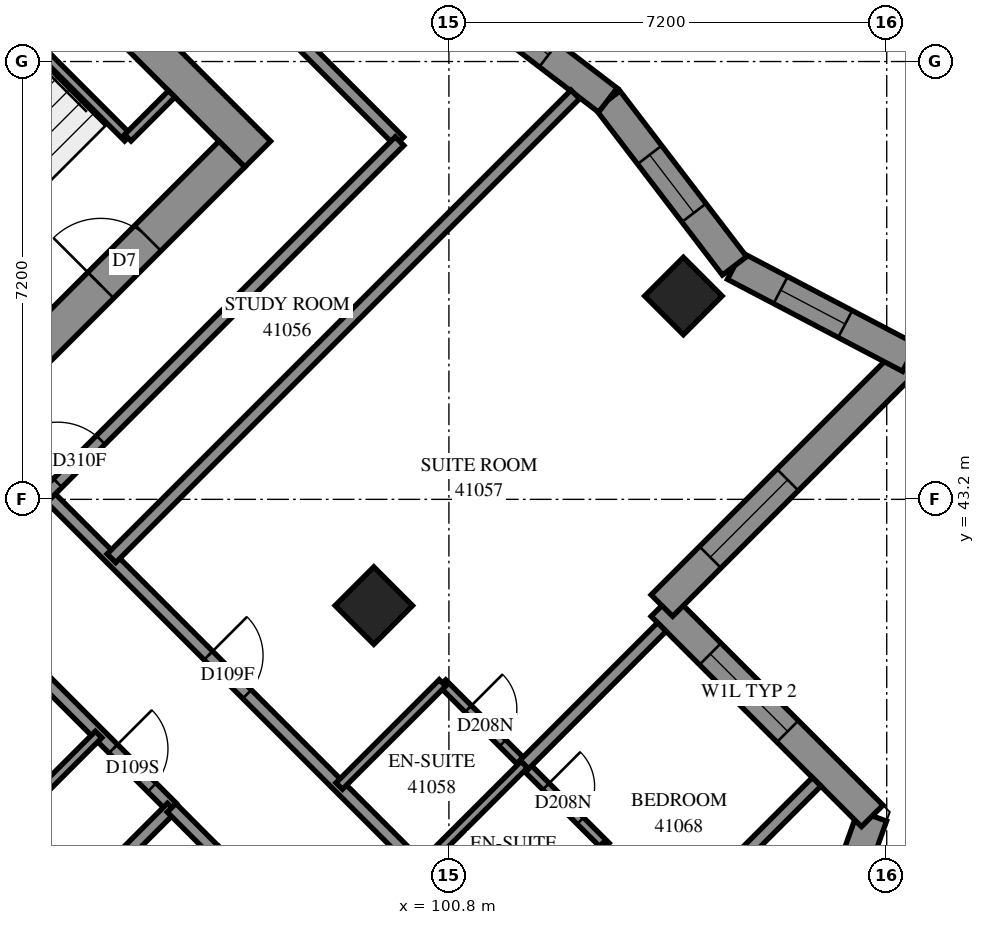
"""IFC4 building model, lengths in metres.
Left out: names, types, materials, properties, quantities, classifications, styles, units other than length and angle.
Written with IfcOpenShell. Run it as: python <this file> out.ifc"""

import sys

from ifc_helpers import new_model, si_unit, direction, frame, frame_2d, origin, origin_2d, place, context, subcontext, project, spatial, polyline, rectangle, outline, extrude, element, fill, save


model = new_model("IFC4")
c1 = context("Model", 3, precision=1e-05, world=origin(), true_north=direction((0.0, 1.0)))
c2 = subcontext(c1, "Body", "Model", "MODEL_VIEW")
j1 = project(units=[si_unit("LENGTHUNIT", "METRE"), si_unit("PLANEANGLEUNIT", "RADIAN")], contexts=[c1])
p1 = place(None, origin())
s1 = spatial("IfcSite", under=j1, at=p1, CompositionType="ELEMENT")
p2 = place(p1, origin())
s2 = spatial("IfcBuilding", under=s1, at=p2, CompositionType="ELEMENT")
p3 = place(p2, frame((0.0, 0.0, 152.4)))
s3 = spatial("IfcBuildingStorey", under=s2, at=p3, CompositionType="ELEMENT", Elevation=152.4)
for number, where, z_axis, x_axis in (
    (1, (104.656, 46.544, 0.0), (0.0, 0.0, 1.0), (0.707, -0.707, 0.0)),
    (2, (99.565, 41.453, 0.0), (0.0, 0.0, 1.0), (0.707, -0.707, 0.0)),
):
    element("IfcColumn", number, at=place(p3, frame(where, z_axis=z_axis, x_axis=x_axis)), inside=s3, PredefinedType="COLUMN", context=c2, shape_type="SweptSolid", body=[
        extrude(rectangle(XDim=0.9, YDim=0.9, at=origin_2d()), origin(), (0.0, 0.0, 1.0), 3.1),
    ])
p4 = place(p3, frame((86.625, 59.908, -0.3), z_axis=(0.0, 0.0, 1.0), x_axis=(0.7071067812, -0.7071067812, 0.0)))
e3 = element("IfcWall", 3, at=p4, inside=s3, PredefinedType="SHEAR", context=c2, shape_type="SweptSolid", body=[
    extrude(rectangle(XDim=15.6, YDim=0.6, at=frame_2d((7.8, 0.0))), origin(), (0.0, 0.0, 1.0), 2.7),
])
p5 = place(p4, frame((10.6, 0.0, 0.3)))
e4 = element("IfcOpeningElement", 4, at=p5, cuts=e3, PredefinedType="OPENING", context=c2, shape_type="SweptSolid", body=[
    extrude(rectangle(XDim=0.8, YDim=2.1, at=frame_2d((0.4, 1.05))), frame((0.0, 0.31, 0.0), z_axis=(0.0, -1.0, 0.0), x_axis=(1.0, 0.0, 0.0)), (0.0, 0.0, 1.0), 0.62),
])
p6 = place(p3, frame((87.049, 38.695, -0.3), z_axis=(0.0, 0.0, 1.0), x_axis=(0.7071067812, 0.7071067812, 0.0)))
e5 = element("IfcWall", 5, at=p6, inside=s3, PredefinedType="SHEAR", context=c2, shape_type="SweptSolid", body=[
    extrude(rectangle(XDim=14.4, YDim=0.6, at=frame_2d((7.2, 0.0))), origin(), (0.0, 0.0, 1.0), 2.7),
])
p7 = place(p6, frame((4.55, 0.0, 0.3)))
e6 = element("IfcOpeningElement", 6, at=p7, cuts=e5, PredefinedType="OPENING", context=c2, shape_type="SweptSolid", body=[
    extrude(rectangle(XDim=1.1, YDim=2.1, at=frame_2d((0.55, 1.05))), frame((0.0, 0.31, 0.0), z_axis=(0.0, -1.0, 0.0), x_axis=(1.0, 0.0, 0.0)), (0.0, 0.0, 1.0), 0.62),
])
p8 = place(p6, frame((11.35, 0.0, 0.3)))
e7 = element("IfcOpeningElement", 7, at=p8, cuts=e5, PredefinedType="OPENING", context=c2, shape_type="SweptSolid", body=[
    extrude(rectangle(XDim=1.1, YDim=2.1, at=frame_2d((0.55, 1.05))), frame((0.0, 0.31, 0.0), z_axis=(0.0, -1.0, 0.0), x_axis=(1.0, 0.0, 0.0)), (0.0, 0.0, 1.0), 0.62),
])
p9 = place(p3, frame((105.97, 32.973, 0.0), z_axis=(0.0, 0.0, 1.0), x_axis=(0.3360618931, 0.9418399036, 0.0)))
e8 = element("IfcWall", 8, at=p9, inside=s3, PredefinedType="SOLIDWALL", context=c2, shape_type="SweptSolid", body=[
    extrude(outline(polyline([(-0.114, -0.25), (5.489, -0.25), (5.173, 0.25), (0.114, 0.25), (-0.114, -0.25)])), origin(), (0.0, 0.0, 1.0), 3.1),
])
p10 = place(p9, frame((1.164, 0.0, 0.45)))
e9 = element("IfcOpeningElement", 9, at=p10, cuts=e8, PredefinedType="OPENING", context=c2, shape_type="SweptSolid", body=[
    extrude(rectangle(XDim=1.2, YDim=2.5, at=frame_2d((0.6, 1.25))), frame((0.0, 0.26, 0.0), z_axis=(0.0, -1.0, 0.0), x_axis=(1.0, 0.0, 0.0)), (0.0, 0.0, 1.0), 0.52),
])
p11 = place(p9, frame((3.494, 0.0, 0.45)))
e10 = element("IfcOpeningElement", 10, at=p11, cuts=e8, PredefinedType="OPENING", context=c2, shape_type="SweptSolid", body=[
    extrude(rectangle(XDim=1.2, YDim=2.5, at=frame_2d((0.6, 1.25))), frame((0.0, 0.26, 0.0), z_axis=(0.0, -1.0, 0.0), x_axis=(1.0, 0.0, 0.0)), (0.0, 0.0, 1.0), 0.52),
])
p12 = place(p3, frame((107.761, 37.994, 0.0), z_axis=(0.0, 0.0, 1.0), x_axis=(-0.7071272228, 0.707086339, 0.0)))
e11 = element("IfcWall", 11, at=p12, inside=s3, PredefinedType="SOLIDWALL", context=c2, shape_type="SweptSolid", body=[
    extrude(outline(polyline([(-0.158, -0.25), (4.642, -0.25), (5.142, 0.25), (0.158, 0.25), (-0.158, -0.25)])), origin(), (0.0, 0.0, 1.0), 3.1),
])
p13 = place(p12, frame((1.967, 0.0, 0.6)))
e12 = element("IfcOpeningElement", 12, at=p13, cuts=e11, PredefinedType="OPENING", context=c2, shape_type="SweptSolid", body=[
    extrude(rectangle(XDim=1.8, YDim=1.9, at=frame_2d((0.9, 0.95))), frame((0.0, 0.26, 0.0), z_axis=(0.0, -1.0, 0.0), x_axis=(1.0, 0.0, 0.0)), (0.0, 0.0, 1.0), 0.52),
])
p14 = place(p3, frame((104.302, 41.453, 0.0), z_axis=(0.0, 0.0, 1.0), x_axis=(0.7071241375, 0.7070894244, 0.0)))
e13 = element("IfcWall", 13, at=p14, inside=s3, PredefinedType="SOLIDWALL", context=c2, shape_type="SweptSolid", body=[
    extrude(outline(polyline([(0.25, -0.25), (6.101, -0.25), (5.422, 0.25), (-0.25, 0.25), (0.25, -0.25)])), origin(), (0.0, 0.0, 1.0), 3.1),
])
p15 = place(p14, frame((1.125, 0.0, 0.6)))
e14 = element("IfcOpeningElement", 14, at=p15, cuts=e13, PredefinedType="OPENING", context=c2, shape_type="SweptSolid", body=[
    extrude(rectangle(XDim=1.8, YDim=1.9, at=frame_2d((0.9, 0.95))), frame((0.0, 0.26, 0.0), z_axis=(0.0, -1.0, 0.0), x_axis=(1.0, 0.0, 0.0)), (0.0, 0.0, 1.0), 0.52),
])
p16 = place(p3, frame((108.376, 45.527, 0.0), z_axis=(0.0, 0.0, 1.0), x_axis=(-0.8852707198, 0.4650760719, 0.0)))
e15 = element("IfcWall", 15, at=p16, inside=s3, PredefinedType="SOLIDWALL", context=c2, shape_type="SweptSolid", body=[
    extrude(outline(polyline([(-0.34, -0.25), (3.198, -0.25), (3.308, 0.25), (0.34, 0.25), (-0.34, -0.25)])), origin(), (0.0, 0.0, 1.0), 3.1),
])
p17 = place(p16, frame((1.196, 0.0, 0.45)))
e16 = element("IfcOpeningElement", 16, at=p17, cuts=e15, PredefinedType="OPENING", context=c2, shape_type="SweptSolid", body=[
    extrude(rectangle(XDim=1.2, YDim=2.5, at=frame_2d((0.6, 1.25))), frame((0.0, 0.26, 0.0), z_axis=(0.0, -1.0, 0.0), x_axis=(1.0, 0.0, 0.0)), (0.0, 0.0, 1.0), 0.52),
])
p18 = place(p3, frame((105.496, 47.04, 0.0), z_axis=(0.0, 0.0, 1.0), x_axis=(-0.6072996528, 0.7944728641, 0.0)))
e17 = element("IfcWall", 17, at=p18, inside=s3, PredefinedType="SOLIDWALL", context=c2, shape_type="SweptSolid", body=[
    extrude(outline(polyline([(0.055, -0.25), (3.463, -0.25), (3.396, 0.25), (-0.055, 0.25), (0.055, -0.25)])), origin(), (0.0, 0.0, 1.0), 3.1),
])
p19 = place(p18, frame((1.098, 0.0, 0.45)))
e18 = element("IfcOpeningElement", 18, at=p19, cuts=e17, PredefinedType="OPENING", context=c2, shape_type="SweptSolid", body=[
    extrude(rectangle(XDim=1.2, YDim=2.5, at=frame_2d((0.6, 1.25))), frame((0.0, 0.26, 0.0), z_axis=(0.0, -1.0, 0.0), x_axis=(1.0, 0.0, 0.0)), (0.0, 0.0, 1.0), 0.52),
])
p20 = place(p3, frame((103.414, 49.764, 0.0), z_axis=(0.0, 0.0, 1.0), x_axis=(-0.7944694348, 0.6073041389, 0.0)))
e19 = element("IfcWall", 19, at=p20, inside=s3, PredefinedType="SOLIDWALL", context=c2, shape_type="SweptSolid", body=[
    extrude(outline(polyline([(-0.033, -0.25), (3.374, -0.25), (3.441, 0.25), (0.033, 0.25), (-0.033, -0.25)])), origin(), (0.0, 0.0, 1.0), 3.1),
])
p21 = place(p20, frame((1.228, 0.0, 0.45)))
e20 = element("IfcOpeningElement", 20, at=p21, cuts=e19, PredefinedType="OPENING", context=c2, shape_type="SweptSolid", body=[
    extrude(rectangle(XDim=1.2, YDim=2.5, at=frame_2d((0.6, 1.25))), frame((0.0, 0.26, 0.0), z_axis=(0.0, -1.0, 0.0), x_axis=(1.0, 0.0, 0.0)), (0.0, 0.0, 1.0), 0.52),
])
p22 = place(p3, frame((91.313, 53.354, 0.0), z_axis=(0.0, 0.0, 1.0), x_axis=(0.7071067812, -0.7071067812, 0.0)))
e21 = element("IfcWall", 21, at=p22, inside=s3, PredefinedType="PARTITIONING", context=c2, shape_type="SweptSolid", body=[
    extrude(rectangle(XDim=5.95, YDim=0.15, at=frame_2d((2.975, 0.0))), origin(), (0.0, 0.0, 1.0), 3.1),
])
p23 = place(p3, frame((95.52, 49.146, 0.0), z_axis=(0.0, 0.0, 1.0), x_axis=(0.7071067812, 0.7071067812, 0.0)))
e22 = element("IfcWall", 22, at=p23, inside=s3, PredefinedType="PARTITIONING", context=c2, shape_type="SweptSolid", body=[
    extrude(rectangle(XDim=1.02, YDim=0.15, at=frame_2d((0.51, 0.0))), origin(), (0.0, 0.0, 1.0), 3.1),
])
p24 = place(p3, frame((94.189, 43.287, 0.0), z_axis=(0.0, 0.0, 1.0), x_axis=(0.7071067812, -0.7071067812, 0.0)))
e23 = element("IfcWall", 23, at=p24, inside=s3, PredefinedType="PARTITIONING", context=c2, shape_type="SweptSolid", body=[
    extrude(rectangle(XDim=12.298, YDim=0.2, at=frame_2d((6.149, 0.0))), origin(), (0.0, 0.0, 1.0), 3.1),
])
p25 = place(p24, frame((3.755, 0.0, 0.0)))
e24 = element("IfcOpeningElement", 24, at=p25, cuts=e23, PredefinedType="OPENING", context=c2, shape_type="SweptSolid", body=[
    extrude(rectangle(XDim=0.9, YDim=2.1, at=frame_2d((0.45, 1.05))), frame((0.0, 0.11, 0.0), z_axis=(0.0, -1.0, 0.0), x_axis=(1.0, 0.0, 0.0)), (0.0, 0.0, 1.0), 0.22),
])
p26 = place(p24, frame((10.998, 0.0, 0.0)))
e25 = element("IfcOpeningElement", 25, at=p26, cuts=e23, PredefinedType="OPENING", context=c2, shape_type="SweptSolid", body=[
    extrude(rectangle(XDim=0.9, YDim=2.1, at=frame_2d((0.45, 1.05))), frame((0.0, 0.11, 0.0), z_axis=(0.0, -1.0, 0.0), x_axis=(1.0, 0.0, 0.0)), (0.0, 0.0, 1.0), 0.22),
])
p27 = place(p3, frame((91.755, 57.317, 0.0), z_axis=(0.0, 0.0, 1.0), x_axis=(0.7071067812, -0.7071067812, 0.0)))
e26 = element("IfcWall", 26, at=p27, inside=s3, PredefinedType="PARTITIONING", context=c2, shape_type="SweptSolid", body=[
    extrude(rectangle(XDim=11.639, YDim=0.2, at=frame_2d((5.819, 0.0))), origin(), (0.0, 0.0, 1.0), 3.1),
])
p28 = place(p3, frame((95.25, 42.232, 0.0), z_axis=(0.0, 0.0, 1.0), x_axis=(0.7071114163, 0.707102146, 0.0)))
e27 = element("IfcWall", 27, at=p28, inside=s3, PredefinedType="PARTITIONING", context=c2, shape_type="SweptSolid", body=[
    extrude(rectangle(XDim=10.787, YDim=0.2, at=frame_2d((5.394, 0.0))), origin(), (0.0, 0.0, 1.0), 3.1),
])
p29 = place(p3, frame((94.19, 43.292, 0.0), z_axis=(0.0, 0.0, 1.0), x_axis=(0.7071067812, 0.7071067812, 0.0)))
e28 = element("IfcWall", 28, at=p29, inside=s3, PredefinedType="PARTITIONING", context=c2, shape_type="SweptSolid", body=[
    extrude(rectangle(XDim=8.2, YDim=0.2, at=frame_2d((4.1, 0.0))), origin(), (0.0, 0.0, 1.0), 3.1),
])
p30 = place(p29, frame((0.251, 0.0, 0.0)))
e29 = element("IfcOpeningElement", 29, at=p30, cuts=e28, PredefinedType="OPENING", context=c2, shape_type="SweptSolid", body=[
    extrude(rectangle(XDim=1.0, YDim=2.1, at=frame_2d((0.5, 1.05))), frame((0.0, 0.11, 0.0), z_axis=(0.0, -1.0, 0.0), x_axis=(1.0, 0.0, 0.0)), (0.0, 0.0, 1.0), 0.22),
])
p31 = place(p3, frame((92.639, 41.739, 0.0), z_axis=(0.0, 0.0, 1.0), x_axis=(0.7071067812, -0.7071067812, 0.0)))
e30 = element("IfcWall", 30, at=p31, inside=s3, PredefinedType="PARTITIONING", context=c2, shape_type="SweptSolid", body=[
    extrude(rectangle(XDim=5.1, YDim=0.2, at=frame_2d((2.55, 0.0))), origin(), (0.0, 0.0, 1.0), 3.1),
])
p32 = place(p31, frame((0.123, 0.0, 0.0)))
e31 = element("IfcOpeningElement", 31, at=p32, cuts=e30, PredefinedType="OPENING", context=c2, shape_type="SweptSolid", body=[
    extrude(rectangle(XDim=1.0, YDim=2.1, at=frame_2d((0.5, 1.05))), frame((0.0, 0.11, 0.0), z_axis=(0.0, -1.0, 0.0), x_axis=(1.0, 0.0, 0.0)), (0.0, 0.0, 1.0), 0.22),
])
p33 = place(p31, frame((3.734, 0.0, 0.0)))
e32 = element("IfcOpeningElement", 32, at=p33, cuts=e30, PredefinedType="OPENING", context=c2, shape_type="SweptSolid", body=[
    extrude(rectangle(XDim=0.9, YDim=2.1, at=frame_2d((0.45, 1.05))), frame((0.0, 0.11, 0.0), z_axis=(0.0, -1.0, 0.0), x_axis=(1.0, 0.0, 0.0)), (0.0, 0.0, 1.0), 0.22),
])
p34 = place(p3, frame((100.694, 40.178, 0.0), z_axis=(0.0, 0.0, 1.0), x_axis=(0.7076329021, -0.7065802685, 0.0)))
e33 = element("IfcWall", 33, at=p34, inside=s3, PredefinedType="PARTITIONING", context=c2, shape_type="SweptSolid", body=[
    extrude(rectangle(XDim=3.8, YDim=0.15, at=frame_2d((1.9, 0.0))), origin(), (0.0, 0.0, 1.0), 3.1),
])
p35 = place(p34, frame((0.598, 0.0, 0.0)))
e34 = element("IfcOpeningElement", 34, at=p35, cuts=e33, PredefinedType="OPENING", context=c2, shape_type="SweptSolid", body=[
    extrude(rectangle(XDim=0.8, YDim=2.1, at=frame_2d((0.4, 1.05))), frame((0.0, 0.085, 0.0), z_axis=(0.0, -1.0, 0.0), x_axis=(1.0, 0.0, 0.0)), (0.0, 0.0, 1.0), 0.17),
])
p36 = place(p34, frame((2.405, 0.0, 0.0)))
e35 = element("IfcOpeningElement", 35, at=p36, cuts=e33, PredefinedType="OPENING", context=c2, shape_type="SweptSolid", body=[
    extrude(rectangle(XDim=0.8, YDim=2.1, at=frame_2d((0.4, 1.05))), frame((0.0, 0.085, 0.0), z_axis=(0.0, -1.0, 0.0), x_axis=(1.0, 0.0, 0.0)), (0.0, 0.0, 1.0), 0.17),
])
p37 = place(p3, frame((102.04, 38.838, 0.0), z_axis=(0.0, 0.0, 1.0), x_axis=(0.7071067812, 0.7071067812, 0.0)))
e36 = element("IfcWall", 36, at=p37, inside=s3, PredefinedType="PARTITIONING", context=c2, shape_type="SweptSolid", body=[
    extrude(rectangle(XDim=3.199, YDim=0.2, at=frame_2d((1.599, 0.0))), origin(), (0.0, 0.0, 1.0), 3.1),
])
p38 = place(p3, frame((105.105, 36.813, 0.0), z_axis=(0.0, 0.0, 1.0), x_axis=(0.7071067812, 0.7071067812, 0.0)))
e37 = element("IfcWall", 37, at=p38, inside=s3, PredefinedType="PARTITIONING", context=c2, shape_type="SweptSolid", body=[
    extrude(rectangle(XDim=2.463, YDim=0.2, at=frame_2d((1.232, 0.0))), origin(), (0.0, 0.0, 1.0), 3.1),
])
for number, where, z_axis, x_axis in (
    (38, (93.341, 37.635, 0.0), (0.0, 0.0, 1.0), (0.707, 0.707, 0.0)),
    (39, (101.685, 35.797, 0.0), (0.0, 0.0, 1.0), (0.707, 0.707, 0.0)),
):
    element("IfcWall", number, at=place(p3, frame(where, z_axis=z_axis, x_axis=x_axis)), inside=s3, PredefinedType="PARTITIONING", context=c2, shape_type="SweptSolid", body=[
        extrude(rectangle(XDim=2.401, YDim=0.15, at=frame_2d((1.201, 0.0))), origin(), (0.0, 0.0, 1.0), 3.1),
    ])
for number, where, z_axis, x_axis in (
    (40, (100.34, 37.142, 0.0), (0.0, 0.0, 1.0), (0.708, 0.707, 0.0)),
    (41, (98.996, 38.486, 0.0), (0.0, 0.0, 1.0), (0.708, 0.707, 0.0)),
):
    element("IfcWall", number, at=place(p3, frame(where, z_axis=z_axis, x_axis=x_axis)), inside=s3, PredefinedType="PARTITIONING", context=c2, shape_type="SweptSolid", body=[
        extrude(rectangle(XDim=2.4, YDim=0.15, at=frame_2d((1.2, 0.0))), origin(), (0.0, 0.0, 1.0), 3.1),
    ])
p39 = place(p3, frame((94.923, 36.813, 0.0), z_axis=(0.0, 0.0, 1.0), x_axis=(0.7071067812, 0.7071067812, 0.0)))
e42 = element("IfcWall", 42, at=p39, inside=s3, PredefinedType="PARTITIONING", context=c2, shape_type="SweptSolid", body=[
    extrude(rectangle(XDim=1.864, YDim=0.2, at=frame_2d((0.932, 0.0))), origin(), (0.0, 0.0, 1.0), 3.1),
])
p40 = place(p3, frame((96.24, 38.128, 0.0), z_axis=(0.0, 0.0, 1.0), x_axis=(0.7061059238, -0.7081062239, 0.0)))
e43 = element("IfcWall", 43, at=p40, inside=s3, PredefinedType="PARTITIONING", context=c2, shape_type="SweptSolid", body=[
    extrude(rectangle(XDim=1.0, YDim=0.2, at=frame_2d((0.5, 0.0))), origin(), (0.0, 0.0, 1.0), 3.1),
])
p41 = place(p13, origin())
e44 = element("IfcWindow", 44, at=p41, inside=s3, PartitioningType="SINGLE_PANEL", PredefinedType="WINDOW", context=c2, shape_type="SweptSolid", body=[
    extrude(rectangle(XDim=1.8, YDim=1.9, at=frame_2d((0.9, 0.95))), frame((0.0, 0.18, 0.0), z_axis=(0.0, -1.0, 0.0), x_axis=(1.0, 0.0, 0.0)), (0.0, 0.0, 1.0), 0.06),
])
fill(e12, e44)
p42 = place(p15, origin())
e45 = element("IfcWindow", 45, at=p42, inside=s3, PartitioningType="SINGLE_PANEL", PredefinedType="WINDOW", context=c2, shape_type="SweptSolid", body=[
    extrude(rectangle(XDim=1.8, YDim=1.9, at=frame_2d((0.9, 0.95))), frame((0.0, 0.18, 0.0), z_axis=(0.0, -1.0, 0.0), x_axis=(1.0, 0.0, 0.0)), (0.0, 0.0, 1.0), 0.06),
])
fill(e14, e45)
p43 = place(p17, origin())
e46 = element("IfcWindow", 46, at=p43, inside=s3, PartitioningType="SINGLE_PANEL", PredefinedType="WINDOW", context=c2, shape_type="SweptSolid", body=[
    extrude(rectangle(XDim=1.2, YDim=2.5, at=frame_2d((0.6, 1.25))), frame((0.0, 0.18, 0.0), z_axis=(0.0, -1.0, 0.0), x_axis=(1.0, 0.0, 0.0)), (0.0, 0.0, 1.0), 0.06),
])
fill(e16, e46)
p44 = place(p19, origin())
e47 = element("IfcWindow", 47, at=p44, inside=s3, PartitioningType="SINGLE_PANEL", PredefinedType="WINDOW", context=c2, shape_type="SweptSolid", body=[
    extrude(rectangle(XDim=1.2, YDim=2.5, at=frame_2d((0.6, 1.25))), frame((0.0, 0.18, 0.0), z_axis=(0.0, -1.0, 0.0), x_axis=(1.0, 0.0, 0.0)), (0.0, 0.0, 1.0), 0.06),
])
fill(e18, e47)
p45 = place(p21, origin())
e48 = element("IfcWindow", 48, at=p45, inside=s3, PartitioningType="SINGLE_PANEL", PredefinedType="WINDOW", context=c2, shape_type="SweptSolid", body=[
    extrude(rectangle(XDim=1.2, YDim=2.5, at=frame_2d((0.6, 1.25))), frame((0.0, 0.18, 0.0), z_axis=(0.0, -1.0, 0.0), x_axis=(1.0, 0.0, 0.0)), (0.0, 0.0, 1.0), 0.06),
])
fill(e20, e48)
p46 = place(p8, origin())
e49 = element("IfcDoor", 49, at=p46, inside=s3, OperationType="SINGLE_SWING_RIGHT", PredefinedType="DOOR", context=c2, shape_type="SweptSolid", body=[
    extrude(rectangle(XDim=1.1, YDim=2.1, at=frame_2d((0.55, 1.05))), frame((0.0, 0.025, 0.0), z_axis=(0.0, -1.0, 0.0), x_axis=(1.0, 0.0, 0.0)), (0.0, 0.0, 1.0), 0.05),
])
fill(e7, e49)
p47 = place(p30, origin())
e50 = element("IfcDoor", 50, at=p47, inside=s3, OperationType="SINGLE_SWING_RIGHT", PredefinedType="DOOR", context=c2, shape_type="SweptSolid", body=[
    extrude(rectangle(XDim=1.0, YDim=2.1, at=frame_2d((0.5, 1.05))), frame((0.0, 0.025, 0.0), z_axis=(0.0, -1.0, 0.0), x_axis=(1.0, 0.0, 0.0)), (0.0, 0.0, 1.0), 0.05),
])
fill(e29, e50)
p48 = place(p25, origin())
e51 = element("IfcDoor", 51, at=p48, inside=s3, OperationType="SINGLE_SWING_RIGHT", PredefinedType="DOOR", context=c2, shape_type="SweptSolid", body=[
    extrude(rectangle(XDim=0.9, YDim=2.1, at=frame_2d((0.45, 1.05))), frame((0.0, 0.025, 0.0), z_axis=(0.0, -1.0, 0.0), x_axis=(1.0, 0.0, 0.0)), (0.0, 0.0, 1.0), 0.05),
])
fill(e24, e51)
p49 = place(p35, origin())
e52 = element("IfcDoor", 52, at=p49, inside=s3, OperationType="SINGLE_SWING_RIGHT", PredefinedType="DOOR", context=c2, shape_type="SweptSolid", body=[
    extrude(rectangle(XDim=0.8, YDim=2.1, at=frame_2d((0.4, 1.05))), frame((0.0, 0.025, 0.0), z_axis=(0.0, -1.0, 0.0), x_axis=(1.0, 0.0, 0.0)), (0.0, 0.0, 1.0), 0.05),
])
fill(e34, e52)
p50 = place(p33, origin())
e53 = element("IfcDoor", 53, at=p50, inside=s3, OperationType="SINGLE_SWING_LEFT", PredefinedType="DOOR", context=c2, shape_type="SweptSolid", body=[
    extrude(rectangle(XDim=0.9, YDim=2.1, at=frame_2d((0.45, 1.05))), frame((0.0, 0.025, 0.0), z_axis=(0.0, -1.0, 0.0), x_axis=(1.0, 0.0, 0.0)), (0.0, 0.0, 1.0), 0.05),
])
fill(e32, e53)
p51 = place(p36, origin())
e54 = element("IfcDoor", 54, at=p51, inside=s3, OperationType="SINGLE_SWING_RIGHT", PredefinedType="DOOR", context=c2, shape_type="SweptSolid", body=[
    extrude(rectangle(XDim=0.8, YDim=2.1, at=frame_2d((0.4, 1.05))), frame((0.0, 0.025, 0.0), z_axis=(0.0, -1.0, 0.0), x_axis=(1.0, 0.0, 0.0)), (0.0, 0.0, 1.0), 0.05),
])
fill(e35, e54)
save(model, sys.argv[1])
